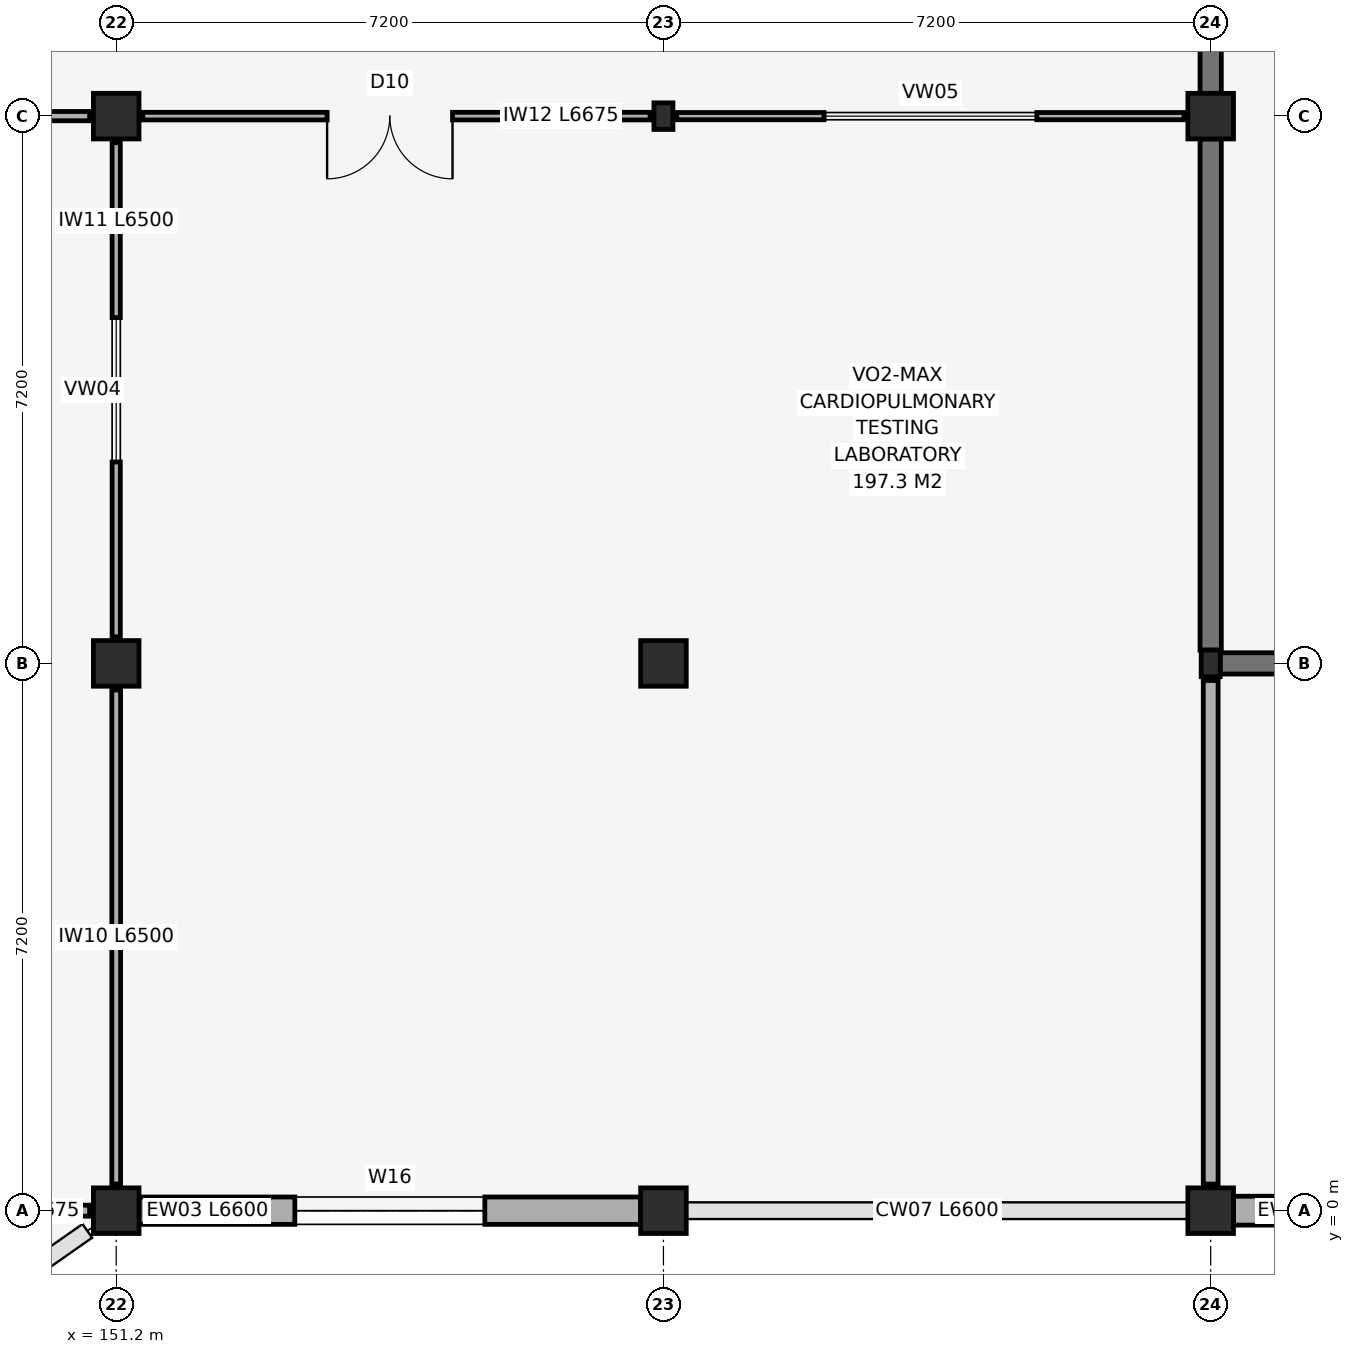
"""IFC4 building model, lengths in metres.
Left out: names, types, materials, properties, quantities, classifications, styles, units other than length and angle.
Written with IfcOpenShell. Run it as: python <this file> out.ifc"""

import sys

from ifc_helpers import new_model, si_unit, direction, frame, frame_2d, origin, origin_2d, place, context, subcontext, project, spatial, rectangle, hollow_rectangle, extrude, element, fill, save


model = new_model("IFC4")
c1 = context("Model", 3, precision=1e-05, world=origin(), true_north=direction((0.0, 1.0)))
c2 = subcontext(c1, "Body", "Model", "MODEL_VIEW")
j1 = project(units=[si_unit("LENGTHUNIT", "METRE"), si_unit("PLANEANGLEUNIT", "RADIAN")], contexts=[c1])
p1 = place(None, origin())
s1 = spatial("IfcSite", under=j1, at=p1, CompositionType="ELEMENT")
p2 = place(p1, origin())
s2 = spatial("IfcBuilding", under=s1, at=p2, CompositionType="ELEMENT")
p3 = place(p2, frame((0.0, 0.0, 15.0)))
s3 = spatial("IfcBuildingStorey", under=s2, at=p3, CompositionType="ELEMENT", Elevation=15.0)
for number, where, z_axis, x_axis in (
    (1, (151.2, 0.0, 0.0), (0.0, 0.0, 1.0), (1.0, 0.0, 0.0)),
    (2, (151.2, 7.2, 0.0), (0.0, 0.0, 1.0), (1.0, 0.0, 0.0)),
    (3, (151.2, 14.4, 0.0), (0.0, 0.0, 1.0), (1.0, 0.0, 0.0)),
    (4, (158.4, 0.0, 0.0), (0.0, 0.0, 1.0), (1.0, 0.0, 0.0)),
    (5, (158.4, 7.2, 0.0), (0.0, 0.0, 1.0), (1.0, 0.0, 0.0)),
):
    element("IfcColumn", number, at=place(p3, frame(where, z_axis=z_axis, x_axis=x_axis)), inside=s3, PredefinedType="COLUMN", context=c2, shape_type="SweptSolid", body=[
        extrude(rectangle(XDim=0.6, YDim=0.6, at=origin_2d()), origin(), (0.0, 0.0, 1.0), 4.2),
    ])
p4 = place(p3, frame((158.4, 14.4, 0.0), z_axis=(0.0, 0.0, 1.0), x_axis=(1.0, 0.0, 0.0)))
e6 = element("IfcColumn", 6, at=p4, inside=s3, PredefinedType="COLUMN", context=c2, shape_type="SweptSolid", body=[
    extrude(hollow_rectangle(XDim=0.25, YDim=0.35, WallThickness=0.012, at=origin_2d()), origin(), (0.0, 0.0, 1.0), 4.2),
])
p5 = place(p3, frame((165.6, 0.0, 0.0), z_axis=(0.0, 0.0, 1.0), x_axis=(1.0, 0.0, 0.0)))
e7 = element("IfcColumn", 7, at=p5, inside=s3, PredefinedType="COLUMN", context=c2, shape_type="SweptSolid", body=[
    extrude(rectangle(XDim=0.6, YDim=0.6, at=origin_2d()), origin(), (0.0, 0.0, 1.0), 4.2),
])
p6 = place(p3, frame((165.6, 7.2, 0.0), z_axis=(0.0, 0.0, 1.0), x_axis=(1.0, 0.0, 0.0)))
e8 = element("IfcColumn", 8, at=p6, inside=s3, PredefinedType="COLUMN", context=c2, shape_type="SweptSolid", body=[
    extrude(hollow_rectangle(XDim=0.25, YDim=0.35, WallThickness=0.012, at=origin_2d()), origin(), (0.0, 0.0, 1.0), 4.2),
])
p7 = place(p3, frame((165.6, 14.4, 0.0), z_axis=(0.0, 0.0, 1.0), x_axis=(1.0, 0.0, 0.0)))
e9 = element("IfcColumn", 9, at=p7, inside=s3, PredefinedType="COLUMN", context=c2, shape_type="SweptSolid", body=[
    extrude(rectangle(XDim=0.6, YDim=0.6, at=origin_2d()), origin(), (0.0, 0.0, 1.0), 4.2),
])
p8 = place(p3, frame((151.5, 0.0, 0.0), z_axis=(0.0, 0.0, 1.0), x_axis=(1.0, 0.0, 0.0)))
e10 = element("IfcWall", 10, at=p8, inside=s3, PredefinedType="SOLIDWALL", context=c2, shape_type="SweptSolid", body=[
    extrude(rectangle(XDim=6.6, YDim=0.36, at=frame_2d((3.3, 0.0))), origin(), (0.0, 0.0, 1.0), 3.16),
])
p9 = place(p8, frame((2.05, 0.0, 0.95)))
e11 = element("IfcOpeningElement", 11, at=p9, cuts=e10, PredefinedType="OPENING", context=c2, shape_type="SweptSolid", body=[
    extrude(rectangle(XDim=2.5, YDim=1.35, at=frame_2d((1.25, 0.675))), frame((0.0, 0.195, 0.0), z_axis=(0.0, -1.0, 0.0), x_axis=(1.0, 0.0, 0.0)), (0.0, 0.0, 1.0), 0.39),
])
p10 = place(p3, frame((165.9, 0.0, 0.0), z_axis=(0.0, 0.0, 1.0), x_axis=(1.0, 0.0, 0.0)))
e12 = element("IfcWall", 12, at=p10, inside=s3, PredefinedType="SOLIDWALL", context=c2, shape_type="SweptSolid", body=[
    extrude(rectangle(XDim=6.775, YDim=0.38, at=frame_2d((3.388, 0.0))), origin(), (0.0, 0.0, 1.0), 3.62),
])
p11 = place(p10, frame((2.488, 0.0, 0.95)))
e13 = element("IfcOpeningElement", 13, at=p11, cuts=e12, PredefinedType="OPENING", context=c2, shape_type="SweptSolid", body=[
    extrude(rectangle(XDim=1.8, YDim=1.75, at=frame_2d((0.9, 0.875))), frame((0.0, 0.205, 0.0), z_axis=(0.0, -1.0, 0.0), x_axis=(1.0, 0.0, 0.0)), (0.0, 0.0, 1.0), 0.41),
])
p12 = place(p3, frame((165.725, 7.2, 0.0), z_axis=(0.0, 0.0, 1.0), x_axis=(1.0, 0.0, 0.0)))
e14 = element("IfcWall", 14, at=p12, inside=s3, PredefinedType="SHEAR", context=c2, shape_type="SweptSolid", body=[
    extrude(rectangle(XDim=6.775, YDim=0.28, at=frame_2d((3.387, 0.0))), origin(), (0.0, 0.0, 1.0), 3.96),
])
p13 = place(p3, frame((165.6, 7.375, 0.0), z_axis=(0.0, 0.0, 1.0), x_axis=(0.0, 1.0, 0.0)))
e15 = element("IfcWall", 15, at=p13, inside=s3, PredefinedType="SHEAR", context=c2, shape_type="SweptSolid", body=[
    extrude(rectangle(XDim=6.725, YDim=0.28, at=frame_2d((3.363, 0.0))), origin(), (0.0, 0.0, 1.0), 3.96),
])
p14 = place(p3, frame((165.6, 14.7, 0.0), z_axis=(0.0, 0.0, 1.0), x_axis=(0.0, 1.0, 0.0)))
e16 = element("IfcWall", 16, at=p14, inside=s3, PredefinedType="SHEAR", context=c2, shape_type="SweptSolid", body=[
    extrude(rectangle(XDim=6.6, YDim=0.28, at=frame_2d((3.3, 0.0))), origin(), (0.0, 0.0, 1.0), 3.96),
])
p15 = place(p14, frame((2.5, 0.0, 0.0)))
e17 = element("IfcOpeningElement", 17, at=p15, cuts=e16, PredefinedType="OPENING", context=c2, shape_type="SweptSolid", body=[
    extrude(rectangle(XDim=1.6, YDim=2.2, at=frame_2d((0.8, 1.1))), frame((0.0, 0.155, 0.0), z_axis=(0.0, -1.0, 0.0), x_axis=(1.0, 0.0, 0.0)), (0.0, 0.0, 1.0), 0.31),
])
p16 = place(p3, frame((144.175, 0.0, 0.0), z_axis=(0.0, 0.0, 1.0), x_axis=(1.0, 0.0, 0.0)))
e18 = element("IfcWall", 18, at=p16, inside=s3, PredefinedType="PARTITIONING", context=c2, shape_type="SweptSolid", body=[
    extrude(rectangle(XDim=6.675, YDim=0.145, at=frame_2d((3.337, 0.0))), origin(), (0.0, 0.0, 1.0), 3.16),
])
p17 = place(p16, frame((2.037, 0.0, 0.95)))
e19 = element("IfcOpeningElement", 19, at=p17, cuts=e18, PredefinedType="OPENING", context=c2, shape_type="SweptSolid", body=[
    extrude(rectangle(XDim=2.6, YDim=1.5, at=frame_2d((1.3, 0.75))), frame((0.0, 0.087, 0.0), z_axis=(0.0, -1.0, 0.0), x_axis=(1.0, 0.0, 0.0)), (0.0, 0.0, 1.0), 0.175),
])
p18 = place(p3, frame((144.35, 14.4, 0.0), z_axis=(0.0, 0.0, 1.0), x_axis=(1.0, 0.0, 0.0)))
e20 = element("IfcWall", 20, at=p18, inside=s3, PredefinedType="PARTITIONING", context=c2, shape_type="SweptSolid", body=[
    extrude(rectangle(XDim=6.5, YDim=0.122, at=frame_2d((3.25, 0.0))), origin(), (0.0, 0.0, 1.0), 3.57),
])
p19 = place(p3, frame((151.2, 0.35, 0.0), z_axis=(0.0, 0.0, 1.0), x_axis=(0.0, 1.0, 0.0)))
e21 = element("IfcWall", 21, at=p19, inside=s3, PredefinedType="PARTITIONING", context=c2, shape_type="SweptSolid", body=[
    extrude(rectangle(XDim=6.5, YDim=0.115, at=frame_2d((3.25, 0.0))), origin(), (0.0, 0.0, 1.0), 3.16),
])
p20 = place(p3, frame((151.2, 7.55, 0.0), z_axis=(0.0, 0.0, 1.0), x_axis=(0.0, 1.0, 0.0)))
e22 = element("IfcWall", 22, at=p20, inside=s3, PredefinedType="PARTITIONING", context=c2, shape_type="SweptSolid", body=[
    extrude(rectangle(XDim=6.5, YDim=0.108, at=frame_2d((3.25, 0.0))), origin(), (0.0, 0.0, 1.0), 3.62),
])
p21 = place(p20, frame((2.3, 0.0, 0.95)))
e23 = element("IfcOpeningElement", 23, at=p21, cuts=e22, PredefinedType="OPENING", context=c2, shape_type="SweptSolid", body=[
    extrude(rectangle(XDim=1.9, YDim=1.5, at=frame_2d((0.95, 0.75))), frame((0.0, 0.069, 0.0), z_axis=(0.0, -1.0, 0.0), x_axis=(1.0, 0.0, 0.0)), (0.0, 0.0, 1.0), 0.138),
])
p22 = place(p3, frame((151.55, 14.4, 0.0), z_axis=(0.0, 0.0, 1.0), x_axis=(1.0, 0.0, 0.0)))
e24 = element("IfcWall", 24, at=p22, inside=s3, PredefinedType="PARTITIONING", context=c2, shape_type="SweptSolid", body=[
    extrude(rectangle(XDim=6.675, YDim=0.1, at=frame_2d((3.337, 0.0))), origin(), (0.0, 0.0, 1.0), 3.57),
])
p23 = place(p22, frame((2.425, 0.0, 0.0)))
e25 = element("IfcOpeningElement", 25, at=p23, cuts=e24, PredefinedType="OPENING", context=c2, shape_type="SweptSolid", body=[
    extrude(rectangle(XDim=1.65, YDim=2.2, at=frame_2d((0.825, 1.1))), frame((0.0, 0.065, 0.0), z_axis=(0.0, -1.0, 0.0), x_axis=(1.0, 0.0, 0.0)), (0.0, 0.0, 1.0), 0.13),
])
p24 = place(p3, frame((158.575, 14.4, 0.0), z_axis=(0.0, 0.0, 1.0), x_axis=(1.0, 0.0, 0.0)))
e26 = element("IfcWall", 26, at=p24, inside=s3, PredefinedType="PARTITIONING", context=c2, shape_type="SweptSolid", body=[
    extrude(rectangle(XDim=6.675, YDim=0.095, at=frame_2d((3.337, 0.0))), origin(), (0.0, 0.0, 1.0), 3.57),
])
p25 = place(p24, frame((1.938, 0.0, 0.95)))
e27 = element("IfcOpeningElement", 27, at=p25, cuts=e26, PredefinedType="OPENING", context=c2, shape_type="SweptSolid", body=[
    extrude(rectangle(XDim=2.8, YDim=1.35, at=frame_2d((1.4, 0.675))), frame((0.0, 0.062, 0.0), z_axis=(0.0, -1.0, 0.0), x_axis=(1.0, 0.0, 0.0)), (0.0, 0.0, 1.0), 0.125),
])
p26 = place(p3, frame((165.6, 0.35, 0.0), z_axis=(0.0, 0.0, 1.0), x_axis=(0.0, 1.0, 0.0)))
e28 = element("IfcWall", 28, at=p26, inside=s3, PredefinedType="PARTITIONING", context=c2, shape_type="SweptSolid", body=[
    extrude(rectangle(XDim=6.625, YDim=0.195, at=frame_2d((3.312, 0.0))), origin(), (0.0, 0.0, 1.0), 3.57),
])
p27 = place(p9, origin())
e29 = element("IfcWindow", 29, at=p27, inside=s3, PartitioningType="SINGLE_PANEL", PredefinedType="WINDOW", context=c2, shape_type="SweptSolid", body=[
    extrude(rectangle(XDim=2.5, YDim=1.35, at=frame_2d((1.25, 0.675))), frame((0.0, 0.03, 0.0), z_axis=(0.0, -1.0, 0.0), x_axis=(1.0, 0.0, 0.0)), (0.0, 0.0, 1.0), 0.06),
])
fill(e11, e29)
p28 = place(p21, origin())
e30 = element("IfcWindow", 30, at=p28, inside=s3, PartitioningType="SINGLE_PANEL", PredefinedType="WINDOW", context=c2, shape_type="SweptSolid", body=[
    extrude(rectangle(XDim=1.9, YDim=1.5, at=frame_2d((0.95, 0.75))), frame((0.0, 0.03, 0.0), z_axis=(0.0, -1.0, 0.0), x_axis=(1.0, 0.0, 0.0)), (0.0, 0.0, 1.0), 0.06),
])
fill(e23, e30)
p29 = place(p23, frame((1.65, 0.0, 0.0), z_axis=(0.0, 0.0, 1.0), x_axis=(-1.0, 0.0, 0.0)))
e31 = element("IfcDoor", 31, at=p29, inside=s3, OperationType="DOUBLE_SWING_LEFT", PredefinedType="DOOR", context=c2, shape_type="SweptSolid", body=[
    extrude(rectangle(XDim=1.65, YDim=2.2, at=frame_2d((0.825, 1.1))), frame((0.0, 0.025, 0.0), z_axis=(0.0, -1.0, 0.0), x_axis=(1.0, 0.0, 0.0)), (0.0, 0.0, 1.0), 0.05),
])
fill(e25, e31)
p30 = place(p25, origin())
e32 = element("IfcWindow", 32, at=p30, inside=s3, PartitioningType="SINGLE_PANEL", PredefinedType="WINDOW", context=c2, shape_type="SweptSolid", body=[
    extrude(rectangle(XDim=2.8, YDim=1.35, at=frame_2d((1.4, 0.675))), frame((0.0, 0.03, 0.0), z_axis=(0.0, -1.0, 0.0), x_axis=(1.0, 0.0, 0.0)), (0.0, 0.0, 1.0), 0.06),
])
fill(e27, e32)
save(model, sys.argv[1])
